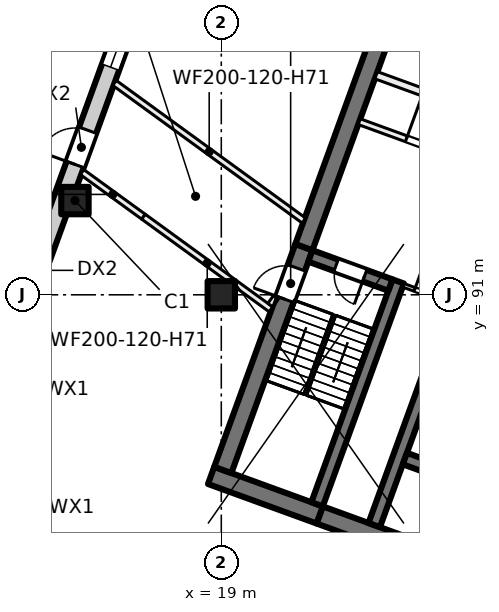
"""IFC4 building model, lengths in metres.
Left out: names, types, materials, properties, quantities, classifications, styles, units other than length and angle.
Written with IfcOpenShell. Run it as: python <this file> out.ifc"""

import sys

from ifc_helpers import new_model, si_unit, direction, frame, frame_2d, origin, origin_2d, place, context, subcontext, project, spatial, rectangle, extrude, element, fill, save


model = new_model("IFC4")
c1 = context("Model", 3, precision=1e-05, world=origin(), true_north=direction((0.0, 1.0)))
c2 = subcontext(c1, "Body", "Model", "MODEL_VIEW")
j1 = project(units=[si_unit("LENGTHUNIT", "METRE"), si_unit("PLANEANGLEUNIT", "RADIAN")], contexts=[c1])
p1 = place(None, origin())
s1 = spatial("IfcSite", under=j1, at=p1, CompositionType="ELEMENT")
p2 = place(p1, origin())
s2 = spatial("IfcBuilding", under=s1, at=p2, CompositionType="ELEMENT")
p3 = place(p2, origin())
s3 = spatial("IfcBuildingStorey", under=s2, at=p3, CompositionType="ELEMENT", Elevation=0.0)
for number, where, z_axis, x_axis in (
    (1, (19.0, 91.0, 0.0), (0.0, 0.0, 1.0), (1.0, 0.0, 0.0)),
    (2, (14.187, 94.099, 0.0), (0.0, 0.0, 1.0), (1.0, 0.0, 0.0)),
):
    element("IfcColumn", number, at=place(p3, frame(where, z_axis=z_axis, x_axis=x_axis)), inside=s3, PredefinedType="COLUMN", context=c2, shape_type="SweptSolid", body=[
        extrude(rectangle(XDim=0.9, YDim=0.9, at=origin_2d()), origin(), (0.0, 0.0, 1.0), 7.5),
    ])
p4 = place(p3, frame((35.767, 78.835, 0.0), z_axis=(0.0, 0.0, 1.0), x_axis=(-0.939692894512, 0.342019391267, 0.0)))
e3 = element("IfcWall", 3, at=p4, inside=s3, PredefinedType="SHEAR", context=c2, shape_type="SweptSolid", body=[
    extrude(rectangle(XDim=14.4, YDim=0.6, at=frame_2d((7.2, 0.0))), origin(), (0.0, 0.0, 1.0), 7.5),
])
p5 = place(p3, frame((22.236, 83.76, 0.0), z_axis=(0.0, 0.0, 1.0), x_axis=(-0.939680822529, 0.342052557032, 0.0)))
e4 = element("IfcWall", 4, at=p5, inside=s3, PredefinedType="SHEAR", context=c2, shape_type="SweptSolid", body=[
    extrude(rectangle(XDim=3.8, YDim=0.6, at=frame_2d((1.9, 0.0))), origin(), (0.0, 0.0, 1.0), 7.5),
])
p6 = place(p3, frame((19.05, 85.239, 0.0), z_axis=(0.0, 0.0, 1.0), x_axis=(0.342016982193, 0.939693771338, 0.0)))
e5 = element("IfcWall", 5, at=p6, inside=s3, PredefinedType="SHEAR", context=c2, shape_type="SweptSolid", body=[
    extrude(rectangle(XDim=7.8, YDim=0.6, at=frame_2d((3.9, 0.0))), origin(), (0.0, 0.0, 1.0), 7.5),
])
p7 = place(p6, frame((5.975, 0.0, 0.0)))
e6 = element("IfcOpeningElement", 6, at=p7, cuts=e5, PredefinedType="OPENING", context=c2, shape_type="SweptSolid", body=[
    extrude(rectangle(XDim=1.1, YDim=2.1, at=frame_2d((0.55, 1.05))), frame((0.0, 0.31, 0.0), z_axis=(0.0, -1.0, 0.0), x_axis=(1.0, 0.0, 0.0)), (0.0, 0.0, 1.0), 0.62),
])
p8 = place(p3, frame((21.717, 92.568, 0.0), z_axis=(0.0, 0.0, 1.0), x_axis=(0.342016162452, 0.939694069696, 0.0)))
e7 = element("IfcWall", 7, at=p8, inside=s3, PredefinedType="SHEAR", context=c2, shape_type="SweptSolid", body=[
    extrude(rectangle(XDim=8.9, YDim=0.6, at=frame_2d((4.45, 0.0))), origin(), (0.0, 0.0, 1.0), 7.5),
])
p9 = place(p3, frame((22.15, 84.11, 0.0), z_axis=(0.0, 0.0, 1.0), x_axis=(0.342016982193, 0.939693771338, 0.0)))
e8 = element("IfcWall", 8, at=p9, inside=s3, PredefinedType="SHEAR", context=c2, shape_type="SweptSolid", body=[
    extrude(rectangle(XDim=7.8, YDim=0.4, at=frame_2d((3.9, 0.0))), origin(), (0.0, 0.0, 1.0), 7.5),
])
p10 = place(p3, frame((24.562, 91.32, 0.0), z_axis=(0.0, 0.0, 1.0), x_axis=(-0.939717030584, 0.341953070509, 0.0)))
e9 = element("IfcWall", 9, at=p10, inside=s3, PredefinedType="SHEAR", context=c2, shape_type="SweptSolid", body=[
    extrude(rectangle(XDim=2.8, YDim=0.4, at=frame_2d((1.4, 0.0))), origin(), (0.0, 0.0, 1.0), 7.5),
])
p11 = place(p10, frame((0.9, 0.0, 0.0)))
e10 = element("IfcOpeningElement", 10, at=p11, cuts=e9, PredefinedType="OPENING", context=c2, shape_type="SweptSolid", body=[
    extrude(rectangle(XDim=1.0, YDim=2.1, at=frame_2d((0.5, 1.05))), frame((0.0, 0.21, 0.0), z_axis=(0.0, -1.0, 0.0), x_axis=(1.0, 0.0, 0.0)), (0.0, 0.0, 1.0), 0.42),
])
p12 = place(p3, frame((24.03, 83.426, 0.0), z_axis=(0.0, 0.0, 1.0), x_axis=(0.342014590177, 0.939694641948, 0.0)))
e11 = element("IfcWall", 11, at=p12, inside=s3, PredefinedType="SHEAR", context=c2, shape_type="SweptSolid", body=[
    extrude(rectangle(XDim=12.2, YDim=0.4, at=frame_2d((6.1, 0.0))), origin(), (0.0, 0.0, 1.0), 7.5),
])
p13 = place(p12, frame((7.9, 0.0, 0.0)))
e12 = element("IfcOpeningElement", 12, at=p13, cuts=e11, PredefinedType="OPENING", context=c2, shape_type="SweptSolid", body=[
    extrude(rectangle(XDim=1.1, YDim=2.1, at=frame_2d((0.55, 1.05))), frame((0.0, 0.21, 0.0), z_axis=(0.0, -1.0, 0.0), x_axis=(1.0, 0.0, 0.0)), (0.0, 0.0, 1.0), 0.42),
])
p14 = place(p3, frame((27.858, 84.587, 0.0), z_axis=(0.0, 0.0, 1.0), x_axis=(-0.939686455819, 0.342037080957, 0.0)))
e13 = element("IfcWall", 13, at=p14, inside=s3, PredefinedType="SHEAR", context=c2, shape_type="SweptSolid", body=[
    extrude(rectangle(XDim=3.0, YDim=0.4, at=frame_2d((1.5, 0.0))), origin(), (0.0, 0.0, 1.0), 7.5),
])
p15 = place(p3, frame((32.953, 97.418, 0.0), z_axis=(0.0, 0.0, 1.0), x_axis=(-0.93969060187, 0.342025690201, 0.0)))
e14 = element("IfcWall", 14, at=p15, inside=s3, PredefinedType="SHEAR", context=c2, shape_type="SweptSolid", body=[
    extrude(rectangle(XDim=8.6, YDim=0.4, at=frame_2d((4.3, 0.0))), origin(), (0.0, 0.0, 1.0), 7.5),
])
p16 = place(p3, frame((12.199, 89.809, 0.0), z_axis=(0.0, 0.0, 1.0), x_axis=(0.342022998908, 0.939691581434, 0.0)))
e15 = element("IfcWall", 15, at=p16, inside=s3, PredefinedType="SOLIDWALL", context=c2, shape_type="SweptSolid", body=[
    extrude(rectangle(XDim=47.334, YDim=0.6, at=frame_2d((23.667, 0.0))), origin(), (0.0, 0.0, 1.0), 7.1),
])
p17 = place(p16, frame((1.523, 0.0, 0.0)))
e16 = element("IfcOpeningElement", 16, at=p17, cuts=e15, PredefinedType="OPENING", context=c2, shape_type="SweptSolid", body=[
    extrude(rectangle(XDim=1.2, YDim=2.4, at=frame_2d((0.6, 1.2))), frame((0.0, 0.31, 0.0), z_axis=(0.0, -1.0, 0.0), x_axis=(1.0, 0.0, 0.0)), (0.0, 0.0, 1.0), 0.62),
])
p18 = place(p16, frame((5.829, 0.0, 0.0)))
e17 = element("IfcOpeningElement", 17, at=p18, cuts=e15, PredefinedType="OPENING", context=c2, shape_type="SweptSolid", body=[
    extrude(rectangle(XDim=1.2, YDim=2.4, at=frame_2d((0.6, 1.2))), frame((0.0, 0.31, 0.0), z_axis=(0.0, -1.0, 0.0), x_axis=(1.0, 0.0, 0.0)), (0.0, 0.0, 1.0), 0.62),
])
p19 = place(p16, frame((9.235, 0.0, 0.9)))
e18 = element("IfcOpeningElement", 18, at=p19, cuts=e15, PredefinedType="OPENING", context=c2, shape_type="SweptSolid", body=[
    extrude(rectangle(XDim=3.0, YDim=4.2, at=frame_2d((1.5, 2.1))), frame((0.0, 0.31, 0.0), z_axis=(0.0, -1.0, 0.0), x_axis=(1.0, 0.0, 0.0)), (0.0, 0.0, 1.0), 0.62),
])
p20 = place(p16, frame((13.99, 0.0, 0.9)))
e19 = element("IfcOpeningElement", 19, at=p20, cuts=e15, PredefinedType="OPENING", context=c2, shape_type="SweptSolid", body=[
    extrude(rectangle(XDim=3.0, YDim=4.2, at=frame_2d((1.5, 2.1))), frame((0.0, 0.31, 0.0), z_axis=(0.0, -1.0, 0.0), x_axis=(1.0, 0.0, 0.0)), (0.0, 0.0, 1.0), 0.62),
])
p21 = place(p16, frame((17.846, 0.0, 0.9)))
e20 = element("IfcOpeningElement", 20, at=p21, cuts=e15, PredefinedType="OPENING", context=c2, shape_type="SweptSolid", body=[
    extrude(rectangle(XDim=3.0, YDim=4.2, at=frame_2d((1.5, 2.1))), frame((0.0, 0.31, 0.0), z_axis=(0.0, -1.0, 0.0), x_axis=(1.0, 0.0, 0.0)), (0.0, 0.0, 1.0), 0.62),
])
p22 = place(p16, frame((22.452, 0.0, 0.9)))
e21 = element("IfcOpeningElement", 21, at=p22, cuts=e15, PredefinedType="OPENING", context=c2, shape_type="SweptSolid", body=[
    extrude(rectangle(XDim=3.0, YDim=4.2, at=frame_2d((1.5, 2.1))), frame((0.0, 0.31, 0.0), z_axis=(0.0, -1.0, 0.0), x_axis=(1.0, 0.0, 0.0)), (0.0, 0.0, 1.0), 0.62),
])
p23 = place(p16, frame((26.458, 0.0, 0.9)))
e22 = element("IfcOpeningElement", 22, at=p23, cuts=e15, PredefinedType="OPENING", context=c2, shape_type="SweptSolid", body=[
    extrude(rectangle(XDim=3.0, YDim=4.2, at=frame_2d((1.5, 2.1))), frame((0.0, 0.31, 0.0), z_axis=(0.0, -1.0, 0.0), x_axis=(1.0, 0.0, 0.0)), (0.0, 0.0, 1.0), 0.62),
])
p24 = place(p16, frame((31.064, 0.0, 0.9)))
e23 = element("IfcOpeningElement", 23, at=p24, cuts=e15, PredefinedType="OPENING", context=c2, shape_type="SweptSolid", body=[
    extrude(rectangle(XDim=3.0, YDim=4.2, at=frame_2d((1.5, 2.1))), frame((0.0, 0.31, 0.0), z_axis=(0.0, -1.0, 0.0), x_axis=(1.0, 0.0, 0.0)), (0.0, 0.0, 1.0), 0.62),
])
p25 = place(p16, frame((36.029, 0.0, 0.9)))
e24 = element("IfcOpeningElement", 24, at=p25, cuts=e15, PredefinedType="OPENING", context=c2, shape_type="SweptSolid", body=[
    extrude(rectangle(XDim=1.2, YDim=4.2, at=frame_2d((0.6, 2.1))), frame((0.0, 0.31, 0.0), z_axis=(0.0, -1.0, 0.0), x_axis=(1.0, 0.0, 0.0)), (0.0, 0.0, 1.0), 0.62),
])
p26 = place(p16, frame((39.676, 0.0, 0.9)))
e25 = element("IfcOpeningElement", 25, at=p26, cuts=e15, PredefinedType="OPENING", context=c2, shape_type="SweptSolid", body=[
    extrude(rectangle(XDim=3.0, YDim=4.2, at=frame_2d((1.5, 2.1))), frame((0.0, 0.31, 0.0), z_axis=(0.0, -1.0, 0.0), x_axis=(1.0, 0.0, 0.0)), (0.0, 0.0, 1.0), 0.62),
])
p27 = place(p16, frame((43.531, 0.0, 0.9)))
e26 = element("IfcOpeningElement", 26, at=p27, cuts=e15, PredefinedType="OPENING", context=c2, shape_type="SweptSolid", body=[
    extrude(rectangle(XDim=3.0, YDim=4.2, at=frame_2d((1.5, 2.1))), frame((0.0, 0.31, 0.0), z_axis=(0.0, -1.0, 0.0), x_axis=(1.0, 0.0, 0.0)), (0.0, 0.0, 1.0), 0.62),
])
p28 = place(p3, frame((23.538, 96.694, 0.0), z_axis=(0.0, 0.0, 1.0), x_axis=(0.939691552312, -0.342023078919, 0.0)))
e27 = element("IfcWall", 27, at=p28, inside=s3, PredefinedType="PARTITIONING", context=c2, shape_type="SweptSolid", body=[
    extrude(rectangle(XDim=8.4, YDim=0.2, at=frame_2d((4.2, 0.0))), origin(), (0.0, 0.0, 1.0), 7.1),
])
p29 = place(p28, frame((1.65, 0.0, 0.0)))
e28 = element("IfcOpeningElement", 28, at=p29, cuts=e27, PredefinedType="OPENING", context=c2, shape_type="SweptSolid", body=[
    extrude(rectangle(XDim=1.5, YDim=2.1, at=frame_2d((0.75, 1.05))), frame((0.0, 0.11, 0.0), z_axis=(0.0, -1.0, 0.0), x_axis=(1.0, 0.0, 0.0)), (0.0, 0.0, 1.0), 0.22),
])
p30 = place(p3, frame((24.094, 98.221, 0.0), z_axis=(0.0, 0.0, 1.0), x_axis=(0.939691552312, -0.342023078919, 0.0)))
e29 = element("IfcWall", 29, at=p30, inside=s3, PredefinedType="PARTITIONING", context=c2, shape_type="SweptSolid", body=[
    extrude(rectangle(XDim=8.4, YDim=0.25, at=frame_2d((4.2, 0.0))), origin(), (0.0, 0.0, 1.0), 7.1),
])
p31 = place(p30, frame((3.8, 0.0, 0.0)))
e30 = element("IfcOpeningElement", 30, at=p31, cuts=e29, PredefinedType="OPENING", context=c2, shape_type="SweptSolid", body=[
    extrude(rectangle(XDim=0.8, YDim=2.1, at=frame_2d((0.4, 1.05))), frame((0.0, 0.135, 0.0), z_axis=(0.0, -1.0, 0.0), x_axis=(1.0, 0.0, 0.0)), (0.0, 0.0, 1.0), 0.27),
])
p32 = place(p3, frame((24.985, 91.312, 0.0), z_axis=(0.0, 0.0, 1.0), x_axis=(0.939708740826, -0.341975850632, 0.0)))
e31 = element("IfcWall", 31, at=p32, inside=s3, PredefinedType="PARTITIONING", context=c2, shape_type="SweptSolid", body=[
    extrude(rectangle(XDim=1.6, YDim=0.125, at=frame_2d((0.8, 0.0))), origin(), (0.0, 0.0, 1.0), 7.1),
])
p33 = place(p32, frame((0.4, 0.0, 0.0)))
e32 = element("IfcOpeningElement", 32, at=p33, cuts=e31, PredefinedType="OPENING", context=c2, shape_type="SweptSolid", body=[
    extrude(rectangle(XDim=0.8, YDim=2.1, at=frame_2d((0.4, 1.05))), frame((0.0, 0.073, 0.0), z_axis=(0.0, -1.0, 0.0), x_axis=(1.0, 0.0, 0.0)), (0.0, 0.0, 1.0), 0.145),
])
p34 = place(p3, frame((14.421, 95.035, 0.0), z_axis=(0.0, 0.0, 1.0), x_axis=(0.809175682169, -0.587566775257, 0.0)))
e33 = element("IfcWall", 33, at=p34, inside=s3, PredefinedType="PARTITIONING", context=c2, shape_type="SweptSolid", body=[
    extrude(rectangle(XDim=2.496, YDim=0.2, at=frame_2d((1.248, 0.0))), origin(), (0.0, 0.0, 1.0), 7.1),
])
p35 = place(p3, frame((15.488, 97.968, 0.0), z_axis=(0.0, 0.0, 1.0), x_axis=(0.809018500784, -0.587783178892, 0.0)))
e34 = element("IfcWall", 34, at=p35, inside=s3, PredefinedType="PARTITIONING", context=c2, shape_type="SweptSolid", body=[
    extrude(rectangle(XDim=7.698, YDim=0.2, at=frame_2d((3.849, 0.0))), origin(), (0.0, 0.0, 1.0), 7.1),
])
p36 = place(p3, frame((16.441, 93.568, 0.0), z_axis=(0.0, 0.0, 1.0), x_axis=(0.808958037441, -0.587866390993, 0.0)))
e35 = element("IfcWall", 35, at=p36, inside=s3, PredefinedType="PARTITIONING", context=c2, shape_type="SweptSolid", body=[
    extrude(rectangle(XDim=5.183, YDim=0.2, at=frame_2d((2.592, 0.0))), origin(), (0.0, 0.0, 1.0), 7.1),
])
p37 = place(p3, frame((20.612, 90.661, 0.0), z_axis=(0.0, 0.0, 1.0), x_axis=(0.588498675879, 0.808498180881, 0.0)))
e36 = element("IfcWall", 36, at=p37, inside=s3, PredefinedType="PARTITIONING", context=c2, shape_type="SweptSolid", body=[
    extrude(rectangle(XDim=0.311, YDim=0.2, at=frame_2d((0.155, 0.0))), origin(), (0.0, 0.0, 1.0), 7.1),
])
p38 = place(p18, origin())
e37 = element("IfcDoor", 37, at=p38, inside=s3, OperationType="SINGLE_SWING_RIGHT", PredefinedType="DOOR", context=c2, shape_type="SweptSolid", body=[
    extrude(rectangle(XDim=1.2, YDim=2.4, at=frame_2d((0.6, 1.2))), frame((0.0, 0.025, 0.0), z_axis=(0.0, -1.0, 0.0), x_axis=(1.0, 0.0, 0.0)), (0.0, 0.0, 1.0), 0.05),
])
fill(e17, e37)
p39 = place(p19, origin())
e38 = element("IfcWindow", 38, at=p39, inside=s3, PartitioningType="SINGLE_PANEL", PredefinedType="WINDOW", context=c2, shape_type="SweptSolid", body=[
    extrude(rectangle(XDim=3.0, YDim=4.2, at=frame_2d((1.5, 2.1))), frame((0.0, 0.03, 0.0), z_axis=(0.0, -1.0, 0.0), x_axis=(1.0, 0.0, 0.0)), (0.0, 0.0, 1.0), 0.06),
])
fill(e18, e38)
p40 = place(p29, origin())
e39 = element("IfcDoor", 39, at=p40, inside=s3, OperationType="DOUBLE_DOOR_SINGLE_SWING", PredefinedType="DOOR", context=c2, shape_type="SweptSolid", body=[
    extrude(rectangle(XDim=1.5, YDim=2.1, at=frame_2d((0.75, 1.05))), frame((0.0, 0.025, 0.0), z_axis=(0.0, -1.0, 0.0), x_axis=(1.0, 0.0, 0.0)), (0.0, 0.0, 1.0), 0.05),
])
fill(e28, e39)
p41 = place(p11, origin())
e40 = element("IfcDoor", 40, at=p41, inside=s3, OperationType="SINGLE_SWING_LEFT", PredefinedType="DOOR", context=c2, shape_type="SweptSolid", body=[
    extrude(rectangle(XDim=1.0, YDim=2.1, at=frame_2d((0.5, 1.05))), frame((0.0, 0.025, 0.0), z_axis=(0.0, -1.0, 0.0), x_axis=(1.0, 0.0, 0.0)), (0.0, 0.0, 1.0), 0.05),
])
fill(e10, e40)
p42 = place(p33, origin())
e41 = element("IfcDoor", 41, at=p42, inside=s3, OperationType="SINGLE_SWING_RIGHT", PredefinedType="DOOR", context=c2, shape_type="SweptSolid", body=[
    extrude(rectangle(XDim=0.8, YDim=2.1, at=frame_2d((0.4, 1.05))), frame((0.0, 0.025, 0.0), z_axis=(0.0, -1.0, 0.0), x_axis=(1.0, 0.0, 0.0)), (0.0, 0.0, 1.0), 0.05),
])
fill(e32, e41)
p43 = place(p7, origin())
e42 = element("IfcDoor", 42, at=p43, inside=s3, OperationType="SINGLE_SWING_LEFT", PredefinedType="DOOR", context=c2, shape_type="SweptSolid", body=[
    extrude(rectangle(XDim=1.1, YDim=2.1, at=frame_2d((0.55, 1.05))), frame((0.0, 0.025, 0.0), z_axis=(0.0, -1.0, 0.0), x_axis=(1.0, 0.0, 0.0)), (0.0, 0.0, 1.0), 0.05),
])
fill(e6, e42)
save(model, sys.argv[1])
